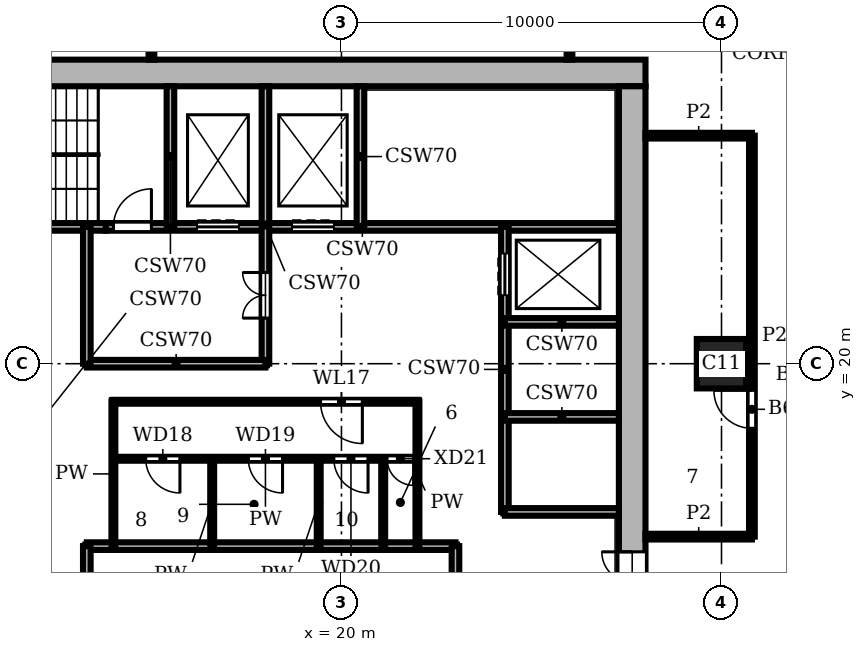
"""IFC4 building model, lengths in metres.
Left out: names, types, materials, properties, quantities, classifications, styles, units other than length and angle.
Written with IfcOpenShell. Run it as: python <this file> out.ifc"""

import sys

from ifc_helpers import new_model, si_unit, direction, frame, frame_2d, origin, origin_2d, place, context, subcontext, project, spatial, rectangle, extrude, element, fill, save


model = new_model("IFC4")
c1 = context("Model", 3, precision=1e-05, world=origin(), true_north=direction((0.0, 1.0)))
c2 = subcontext(c1, "Body", "Model", "MODEL_VIEW")
j1 = project(units=[si_unit("LENGTHUNIT", "METRE"), si_unit("PLANEANGLEUNIT", "RADIAN")], contexts=[c1])
p1 = place(None, origin())
s1 = spatial("IfcSite", under=j1, at=p1, CompositionType="ELEMENT")
p2 = place(p1, origin())
s2 = spatial("IfcBuilding", under=s1, at=p2, CompositionType="ELEMENT")
p3 = place(p2, frame((0.0, 0.0, 190.2)))
s3 = spatial("IfcBuildingStorey", under=s2, at=p3, CompositionType="ELEMENT", Elevation=190.2)
p4 = place(p3, frame((30.0, 20.0, 0.0), z_axis=(0.0, 0.0, 1.0), x_axis=(1.0, 0.0, 0.0)))
e1 = element("IfcColumn", 1, at=p4, inside=s3, PredefinedType="COLUMN", context=c2, shape_type="SweptSolid", body=[
    extrude(rectangle(XDim=1.3, YDim=1.3, at=origin_2d()), origin(), (0.0, 0.0, 1.0), 3.9),
])
p5 = place(p3, frame((27.65, 8.7, 0.0), z_axis=(0.0, 0.0, 1.0), x_axis=(0.0, 1.0, 0.0)))
e2 = element("IfcWall", 2, at=p5, inside=s3, PredefinedType="SHEAR", context=c2, shape_type="SweptSolid", body=[
    extrude(rectangle(XDim=18.6, YDim=0.7, at=frame_2d((9.3, 0.0))), origin(), (0.0, 0.0, 1.0), 3.9),
])
p6 = place(p5, frame((4.75, 0.0, 0.0)))
e3 = element("IfcOpeningElement", 3, at=p6, cuts=e2, PredefinedType="OPENING", context=c2, shape_type="SweptSolid", body=[
    extrude(rectangle(XDim=1.6, YDim=2.1, at=frame_2d((0.8, 1.05))), frame((0.0, 0.36, 0.0), z_axis=(0.0, -1.0, 0.0), x_axis=(1.0, 0.0, 0.0)), (0.0, 0.0, 1.0), 0.72),
])
p7 = place(p3, frame((28.0, 27.65, 0.0), z_axis=(0.0, 0.0, 1.0), x_axis=(-1.0, 0.0, 0.0)))
e4 = element("IfcWall", 4, at=p7, inside=s3, PredefinedType="SHEAR", context=c2, shape_type="SweptSolid", body=[
    extrude(rectangle(XDim=20.0, YDim=0.7, at=frame_2d((10.0, 0.0))), origin(), (0.0, 0.0, 1.0), 3.9),
])
p8 = place(p3, frame((13.3, 15.2, 0.0), z_axis=(0.0, 0.0, 1.0), x_axis=(1.0, 0.0, 0.0)))
e5 = element("IfcWall", 5, at=p8, inside=s3, PredefinedType="SHEAR", context=c2, shape_type="SweptSolid", body=[
    extrude(rectangle(XDim=9.7, YDim=0.2, at=frame_2d((4.85, 0.0))), origin(), (0.0, 0.0, 1.0), 3.58),
])
p9 = place(p3, frame((24.3, 16.1, 0.0), z_axis=(0.0, 0.0, 1.0), x_axis=(1.0, 0.0, 0.0)))
e6 = element("IfcWall", 6, at=p9, inside=s3, PredefinedType="SHEAR", context=c2, shape_type="SweptSolid", body=[
    extrude(rectangle(XDim=3.0, YDim=0.2, at=frame_2d((1.5, 0.0))), origin(), (0.0, 0.0, 1.0), 3.58),
])
p10 = place(p3, frame((14.0, 17.5, 0.0), z_axis=(0.0, 0.0, 1.0), x_axis=(1.0, 0.0, 0.0)))
e7 = element("IfcWall", 7, at=p10, inside=s3, PredefinedType="PARTITIONING", context=c2, shape_type="SweptSolid", body=[
    extrude(rectangle(XDim=8.0, YDim=0.1, at=frame_2d((4.0, 0.0))), origin(), (0.0, 0.0, 1.0), 3.58),
])
p11 = place(p10, frame((0.85, 0.0, 0.0)))
e8 = element("IfcOpeningElement", 8, at=p11, cuts=e7, PredefinedType="OPENING", context=c2, shape_type="SweptSolid", body=[
    extrude(rectangle(XDim=0.9, YDim=2.1, at=frame_2d((0.45, 1.05))), frame((0.0, 0.06, 0.0), z_axis=(0.0, -1.0, 0.0), x_axis=(1.0, 0.0, 0.0)), (0.0, 0.0, 1.0), 0.12),
])
p12 = place(p10, frame((3.55, 0.0, 0.0)))
e9 = element("IfcOpeningElement", 9, at=p12, cuts=e7, PredefinedType="OPENING", context=c2, shape_type="SweptSolid", body=[
    extrude(rectangle(XDim=0.9, YDim=2.1, at=frame_2d((0.45, 1.05))), frame((0.0, 0.06, 0.0), z_axis=(0.0, -1.0, 0.0), x_axis=(1.0, 0.0, 0.0)), (0.0, 0.0, 1.0), 0.12),
])
p13 = place(p10, frame((5.8, 0.0, 0.0)))
e10 = element("IfcOpeningElement", 10, at=p13, cuts=e7, PredefinedType="OPENING", context=c2, shape_type="SweptSolid", body=[
    extrude(rectangle(XDim=0.9, YDim=2.1, at=frame_2d((0.45, 1.05))), frame((0.0, 0.06, 0.0), z_axis=(0.0, -1.0, 0.0), x_axis=(1.0, 0.0, 0.0)), (0.0, 0.0, 1.0), 0.12),
])
p14 = place(p10, frame((7.2, 0.0, 0.0)))
e11 = element("IfcOpeningElement", 11, at=p14, cuts=e7, PredefinedType="OPENING", context=c2, shape_type="SweptSolid", body=[
    extrude(rectangle(XDim=0.7, YDim=2.1, at=frame_2d((0.35, 1.05))), frame((0.0, 0.06, 0.0), z_axis=(0.0, -1.0, 0.0), x_axis=(1.0, 0.0, 0.0)), (0.0, 0.0, 1.0), 0.12),
])
p15 = place(p3, frame((24.3, 18.6, 0.0), z_axis=(0.0, 0.0, 1.0), x_axis=(1.0, 0.0, 0.0)))
e12 = element("IfcWall", 12, at=p15, inside=s3, PredefinedType="SHEAR", context=c2, shape_type="SweptSolid", body=[
    extrude(rectangle(XDim=3.0, YDim=0.2, at=frame_2d((1.5, 0.0))), origin(), (0.0, 0.0, 1.0), 3.58),
])
p16 = place(p3, frame((14.0, 19.0, 0.0), z_axis=(0.0, 0.0, 1.0), x_axis=(1.0, 0.0, 0.0)))
e13 = element("IfcWall", 13, at=p16, inside=s3, PredefinedType="PARTITIONING", context=c2, shape_type="SweptSolid", body=[
    extrude(rectangle(XDim=8.0, YDim=0.1, at=frame_2d((4.0, 0.0))), origin(), (0.0, 0.0, 1.0), 3.58),
])
p17 = place(p16, frame((5.45, 0.0, 0.0)))
e14 = element("IfcOpeningElement", 14, at=p17, cuts=e13, PredefinedType="OPENING", context=c2, shape_type="SweptSolid", body=[
    extrude(rectangle(XDim=1.1, YDim=2.1, at=frame_2d((0.55, 1.05))), frame((0.0, 0.06, 0.0), z_axis=(0.0, -1.0, 0.0), x_axis=(1.0, 0.0, 0.0)), (0.0, 0.0, 1.0), 0.12),
])
p18 = place(p3, frame((13.3, 20.0, 0.0), z_axis=(0.0, 0.0, 1.0), x_axis=(1.0, 0.0, 0.0)))
e15 = element("IfcWall", 15, at=p18, inside=s3, PredefinedType="SHEAR", context=c2, shape_type="SweptSolid", body=[
    extrude(rectangle(XDim=4.7, YDim=0.2, at=frame_2d((2.35, 0.0))), origin(), (0.0, 0.0, 1.0), 3.58),
])
p19 = place(p3, frame((24.3, 21.1, 0.0), z_axis=(0.0, 0.0, 1.0), x_axis=(1.0, 0.0, 0.0)))
e16 = element("IfcWall", 16, at=p19, inside=s3, PredefinedType="SHEAR", context=c2, shape_type="SweptSolid", body=[
    extrude(rectangle(XDim=3.0, YDim=0.2, at=frame_2d((1.5, 0.0))), origin(), (0.0, 0.0, 1.0), 3.58),
])
p20 = place(p3, frame((8.7, 23.6, 0.0), z_axis=(0.0, 0.0, 1.0), x_axis=(1.0, 0.0, 0.0)))
e17 = element("IfcWall", 17, at=p20, inside=s3, PredefinedType="SHEAR", context=c2, shape_type="SweptSolid", body=[
    extrude(rectangle(XDim=5.1, YDim=0.2, at=frame_2d((2.55, 0.0))), origin(), (0.0, 0.0, 1.0), 3.58),
])
p21 = place(p3, frame((13.8, 23.6, 0.0), z_axis=(0.0, 0.0, 1.0), x_axis=(1.0, 0.0, 0.0)))
e18 = element("IfcWall", 18, at=p21, inside=s3, PredefinedType="SHEAR", context=c2, shape_type="SweptSolid", body=[
    extrude(rectangle(XDim=13.5, YDim=0.2, at=frame_2d((6.75, 0.0))), origin(), (0.0, 0.0, 1.0), 3.58),
])
p22 = place(p21, frame((2.4, 0.0, 0.0)))
e19 = element("IfcOpeningElement", 19, at=p22, cuts=e18, PredefinedType="OPENING", context=c2, shape_type="SweptSolid", body=[
    extrude(rectangle(XDim=1.1, YDim=2.1, at=frame_2d((0.55, 1.05))), frame((0.0, 0.11, 0.0), z_axis=(0.0, -1.0, 0.0), x_axis=(1.0, 0.0, 0.0)), (0.0, 0.0, 1.0), 0.22),
])
p23 = place(p21, frame((4.9, 0.0, 0.0)))
e20 = element("IfcOpeningElement", 20, at=p23, cuts=e18, PredefinedType="OPENING", context=c2, shape_type="SweptSolid", body=[
    extrude(rectangle(XDim=1.1, YDim=2.1, at=frame_2d((0.55, 1.05))), frame((0.0, 0.11, 0.0), z_axis=(0.0, -1.0, 0.0), x_axis=(1.0, 0.0, 0.0)), (0.0, 0.0, 1.0), 0.22),
])
p24 = place(p21, frame((0.2, 0.0, 0.0)))
e21 = element("IfcOpeningElement", 21, at=p24, cuts=e18, PredefinedType="OPENING", context=c2, shape_type="SweptSolid", body=[
    extrude(rectangle(XDim=1.0, YDim=2.1, at=frame_2d((0.5, 1.05))), frame((0.0, 0.11, 0.0), z_axis=(0.0, -1.0, 0.0), x_axis=(1.0, 0.0, 0.0)), (0.0, 0.0, 1.0), 0.22),
])
p25 = place(p3, frame((13.3, 12.4, 0.0), z_axis=(0.0, 0.0, 1.0), x_axis=(0.0, 1.0, 0.0)))
e22 = element("IfcWall", 22, at=p25, inside=s3, PredefinedType="SHEAR", context=c2, shape_type="SweptSolid", body=[
    extrude(rectangle(XDim=2.8, YDim=0.2, at=frame_2d((1.4, 0.0))), origin(), (0.0, 0.0, 1.0), 3.58),
])
p26 = place(p3, frame((13.3, 20.0, 0.0), z_axis=(0.0, 0.0, 1.0), x_axis=(0.0, 1.0, 0.0)))
e23 = element("IfcWall", 23, at=p26, inside=s3, PredefinedType="SHEAR", context=c2, shape_type="SweptSolid", body=[
    extrude(rectangle(XDim=3.6, YDim=0.2, at=frame_2d((1.8, 0.0))), origin(), (0.0, 0.0, 1.0), 3.58),
])
p27 = place(p3, frame((14.0, 15.2, 0.0), z_axis=(0.0, 0.0, 1.0), x_axis=(0.0, 1.0, 0.0)))
e24 = element("IfcWall", 24, at=p27, inside=s3, PredefinedType="PARTITIONING", context=c2, shape_type="SweptSolid", body=[
    extrude(rectangle(XDim=3.8, YDim=0.1, at=frame_2d((1.9, 0.0))), origin(), (0.0, 0.0, 1.0), 3.58),
])
p28 = place(p3, frame((15.5, 23.6, 0.0), z_axis=(0.0, 0.0, 1.0), x_axis=(0.0, 1.0, 0.0)))
e25 = element("IfcWall", 25, at=p28, inside=s3, PredefinedType="SHEAR", context=c2, shape_type="SweptSolid", body=[
    extrude(rectangle(XDim=3.7, YDim=0.2, at=frame_2d((1.85, 0.0))), origin(), (0.0, 0.0, 1.0), 3.58),
])
p29 = place(p3, frame((16.6, 15.2, 0.0), z_axis=(0.0, 0.0, 1.0), x_axis=(0.0, 1.0, 0.0)))
e26 = element("IfcWall", 26, at=p29, inside=s3, PredefinedType="PARTITIONING", context=c2, shape_type="SweptSolid", body=[
    extrude(rectangle(XDim=2.3, YDim=0.1, at=frame_2d((1.15, 0.0))), origin(), (0.0, 0.0, 1.0), 3.58),
])
p30 = place(p3, frame((18.0, 20.0, 0.0), z_axis=(0.0, 0.0, 1.0), x_axis=(0.0, 1.0, 0.0)))
e27 = element("IfcWall", 27, at=p30, inside=s3, PredefinedType="SHEAR", context=c2, shape_type="SweptSolid", body=[
    extrude(rectangle(XDim=7.3, YDim=0.2, at=frame_2d((3.65, 0.0))), origin(), (0.0, 0.0, 1.0), 3.58),
])
p31 = place(p30, frame((1.2, 0.0, 0.0)))
e28 = element("IfcOpeningElement", 28, at=p31, cuts=e27, PredefinedType="OPENING", context=c2, shape_type="SweptSolid", body=[
    extrude(rectangle(XDim=1.2, YDim=2.1, at=frame_2d((0.6, 1.05))), frame((0.0, 0.11, 0.0), z_axis=(0.0, -1.0, 0.0), x_axis=(1.0, 0.0, 0.0)), (0.0, 0.0, 1.0), 0.22),
])
p32 = place(p3, frame((19.4, 15.2, 0.0), z_axis=(0.0, 0.0, 1.0), x_axis=(0.0, 1.0, 0.0)))
e29 = element("IfcWall", 29, at=p32, inside=s3, PredefinedType="PARTITIONING", context=c2, shape_type="SweptSolid", body=[
    extrude(rectangle(XDim=2.3, YDim=0.1, at=frame_2d((1.15, 0.0))), origin(), (0.0, 0.0, 1.0), 3.58),
])
p33 = place(p3, frame((20.5, 23.6, 0.0), z_axis=(0.0, 0.0, 1.0), x_axis=(0.0, 1.0, 0.0)))
e30 = element("IfcWall", 30, at=p33, inside=s3, PredefinedType="SHEAR", context=c2, shape_type="SweptSolid", body=[
    extrude(rectangle(XDim=3.7, YDim=0.2, at=frame_2d((1.85, 0.0))), origin(), (0.0, 0.0, 1.0), 3.58),
])
p34 = place(p3, frame((21.1, 15.2, 0.0), z_axis=(0.0, 0.0, 1.0), x_axis=(0.0, 1.0, 0.0)))
e31 = element("IfcWall", 31, at=p34, inside=s3, PredefinedType="PARTITIONING", context=c2, shape_type="SweptSolid", body=[
    extrude(rectangle(XDim=2.3, YDim=0.1, at=frame_2d((1.15, 0.0))), origin(), (0.0, 0.0, 1.0), 3.58),
])
p35 = place(p3, frame((22.0, 15.2, 0.0), z_axis=(0.0, 0.0, 1.0), x_axis=(0.0, 1.0, 0.0)))
e32 = element("IfcWall", 32, at=p35, inside=s3, PredefinedType="PARTITIONING", context=c2, shape_type="SweptSolid", body=[
    extrude(rectangle(XDim=3.8, YDim=0.1, at=frame_2d((1.9, 0.0))), origin(), (0.0, 0.0, 1.0), 3.58),
])
p36 = place(p3, frame((23.0, 12.4, 0.0), z_axis=(0.0, 0.0, 1.0), x_axis=(0.0, 1.0, 0.0)))
e33 = element("IfcWall", 33, at=p36, inside=s3, PredefinedType="SHEAR", context=c2, shape_type="SweptSolid", body=[
    extrude(rectangle(XDim=2.8, YDim=0.2, at=frame_2d((1.4, 0.0))), origin(), (0.0, 0.0, 1.0), 3.58),
])
p37 = place(p36, frame((0.8, 0.0, 0.0)))
e34 = element("IfcOpeningElement", 34, at=p37, cuts=e33, PredefinedType="OPENING", context=c2, shape_type="SweptSolid", body=[
    extrude(rectangle(XDim=1.2, YDim=2.1, at=frame_2d((0.6, 1.05))), frame((0.0, 0.11, 0.0), z_axis=(0.0, -1.0, 0.0), x_axis=(1.0, 0.0, 0.0)), (0.0, 0.0, 1.0), 0.22),
])
p38 = place(p3, frame((24.3, 16.1, 0.0), z_axis=(0.0, 0.0, 1.0), x_axis=(0.0, 1.0, 0.0)))
e35 = element("IfcWall", 35, at=p38, inside=s3, PredefinedType="SHEAR", context=c2, shape_type="SweptSolid", body=[
    extrude(rectangle(XDim=7.5, YDim=0.2, at=frame_2d((3.75, 0.0))), origin(), (0.0, 0.0, 1.0), 3.58),
])
p39 = place(p38, frame((5.7, 0.0, 0.0)))
e36 = element("IfcOpeningElement", 36, at=p39, cuts=e35, PredefinedType="OPENING", context=c2, shape_type="SweptSolid", body=[
    extrude(rectangle(XDim=1.1, YDim=2.1, at=frame_2d((0.55, 1.05))), frame((0.0, 0.11, 0.0), z_axis=(0.0, -1.0, 0.0), x_axis=(1.0, 0.0, 0.0)), (0.0, 0.0, 1.0), 0.22),
])
p40 = place(p3, frame((15.0, 28.0, 0.0), z_axis=(0.0, 0.0, 1.0), x_axis=(0.0, 1.0, 0.0)))
e37 = element("IfcWall", 37, at=p40, inside=s3, PredefinedType="PARTITIONING", context=c2, shape_type="SweptSolid", body=[
    extrude(rectangle(XDim=9.5, YDim=0.15, at=frame_2d((4.75, 0.0))), origin(), (0.0, 0.0, 1.0), 3.58),
])
p41 = place(p3, frame((26.0, 28.0, 0.0), z_axis=(0.0, 0.0, 1.0), x_axis=(0.0, 1.0, 0.0)))
e38 = element("IfcWall", 38, at=p41, inside=s3, PredefinedType="PARTITIONING", context=c2, shape_type="SweptSolid", body=[
    extrude(rectangle(XDim=29.6, YDim=0.15, at=frame_2d((14.8, 0.0))), origin(), (0.0, 0.0, 1.0), 3.58),
])
p42 = place(p41, frame((2.85, 0.0, 0.0)))
e39 = element("IfcOpeningElement", 39, at=p42, cuts=e38, PredefinedType="OPENING", context=c2, shape_type="SweptSolid", body=[
    extrude(rectangle(XDim=1.8, YDim=2.1, at=frame_2d((0.9, 1.05))), frame((0.0, 0.085, 0.0), z_axis=(0.0, -1.0, 0.0), x_axis=(1.0, 0.0, 0.0)), (0.0, 0.0, 1.0), 0.17),
])
p43 = place(p41, frame((12.6, 0.0, 0.0)))
e40 = element("IfcOpeningElement", 40, at=p43, cuts=e38, PredefinedType="OPENING", context=c2, shape_type="SweptSolid", body=[
    extrude(rectangle(XDim=1.8, YDim=2.1, at=frame_2d((0.9, 1.05))), frame((0.0, 0.085, 0.0), z_axis=(0.0, -1.0, 0.0), x_axis=(1.0, 0.0, 0.0)), (0.0, 0.0, 1.0), 0.17),
])
p44 = place(p41, frame((21.6, 0.0, 0.0)))
e41 = element("IfcOpeningElement", 41, at=p44, cuts=e38, PredefinedType="OPENING", context=c2, shape_type="SweptSolid", body=[
    extrude(rectangle(XDim=1.0, YDim=2.1, at=frame_2d((0.5, 1.05))), frame((0.0, 0.085, 0.0), z_axis=(0.0, -1.0, 0.0), x_axis=(1.0, 0.0, 0.0)), (0.0, 0.0, 1.0), 0.17),
])
p45 = place(p3, frame((30.8, 15.45, 0.0), z_axis=(0.0, 0.0, 1.0), x_axis=(0.0, 1.0, 0.0)))
e42 = element("IfcWall", 42, at=p45, inside=s3, PredefinedType="PARTITIONING", context=c2, shape_type="SweptSolid", body=[
    extrude(rectangle(XDim=10.55, YDim=0.15, at=frame_2d((5.275, 0.0))), origin(), (0.0, 0.0, 1.0), 3.58),
])
p46 = place(p45, frame((2.85, 0.0, 0.0)))
e43 = element("IfcOpeningElement", 43, at=p46, cuts=e42, PredefinedType="OPENING", context=c2, shape_type="SweptSolid", body=[
    extrude(rectangle(XDim=1.0, YDim=2.1, at=frame_2d((0.5, 1.05))), frame((0.0, 0.085, 0.0), z_axis=(0.0, -1.0, 0.0), x_axis=(1.0, 0.0, 0.0)), (0.0, 0.0, 1.0), 0.17),
])
for number, where, z_axis, x_axis in (
    (44, (28.0, 15.45, 0.0), (0.0, 0.0, 1.0), (1.0, 0.0, 0.0)),
    (45, (28.0, 26.0, 0.0), (0.0, 0.0, 1.0), (1.0, 0.0, 0.0)),
):
    element("IfcWall", number, at=place(p3, frame(where, z_axis=z_axis, x_axis=x_axis)), inside=s3, PredefinedType="PARTITIONING", context=c2, shape_type="SweptSolid", body=[
        extrude(rectangle(XDim=2.8, YDim=0.15, at=frame_2d((1.4, 0.0))), origin(), (0.0, 0.0, 1.0), 3.58),
    ])
p47 = place(p39, origin())
e46 = element("IfcDoor", 46, at=p47, inside=s3, OperationType="DOUBLE_DOOR_SLIDING", PredefinedType="DOOR", context=c2, shape_type="SweptSolid", body=[
    extrude(rectangle(XDim=1.1, YDim=2.1, at=frame_2d((0.55, 1.05))), frame((0.0, 0.025, 0.0), z_axis=(0.0, -1.0, 0.0), x_axis=(1.0, 0.0, 0.0)), (0.0, 0.0, 1.0), 0.05),
])
fill(e36, e46)
p48 = place(p22, origin())
e47 = element("IfcDoor", 47, at=p48, inside=s3, OperationType="DOUBLE_DOOR_SLIDING", PredefinedType="DOOR", context=c2, shape_type="SweptSolid", body=[
    extrude(rectangle(XDim=1.1, YDim=2.1, at=frame_2d((0.55, 1.05))), frame((0.0, 0.025, 0.0), z_axis=(0.0, -1.0, 0.0), x_axis=(1.0, 0.0, 0.0)), (0.0, 0.0, 1.0), 0.05),
])
fill(e19, e47)
p49 = place(p23, origin())
e48 = element("IfcDoor", 48, at=p49, inside=s3, OperationType="DOUBLE_DOOR_SLIDING", PredefinedType="DOOR", context=c2, shape_type="SweptSolid", body=[
    extrude(rectangle(XDim=1.1, YDim=2.1, at=frame_2d((0.55, 1.05))), frame((0.0, 0.025, 0.0), z_axis=(0.0, -1.0, 0.0), x_axis=(1.0, 0.0, 0.0)), (0.0, 0.0, 1.0), 0.05),
])
fill(e20, e48)
p50 = place(p24, origin())
e49 = element("IfcDoor", 49, at=p50, inside=s3, OperationType="SINGLE_SWING_RIGHT", PredefinedType="DOOR", context=c2, shape_type="SweptSolid", body=[
    extrude(rectangle(XDim=1.0, YDim=2.1, at=frame_2d((0.5, 1.05))), frame((0.0, 0.025, 0.0), z_axis=(0.0, -1.0, 0.0), x_axis=(1.0, 0.0, 0.0)), (0.0, 0.0, 1.0), 0.05),
])
fill(e21, e49)
p51 = place(p31, origin())
e50 = element("IfcDoor", 50, at=p51, inside=s3, OperationType="DOUBLE_DOOR_SINGLE_SWING", PredefinedType="DOOR", context=c2, shape_type="SweptSolid", body=[
    extrude(rectangle(XDim=1.2, YDim=2.1, at=frame_2d((0.6, 1.05))), frame((0.0, 0.025, 0.0), z_axis=(0.0, -1.0, 0.0), x_axis=(1.0, 0.0, 0.0)), (0.0, 0.0, 1.0), 0.05),
])
fill(e28, e50)
p52 = place(p17, frame((1.1, 0.0, 0.0), z_axis=(0.0, 0.0, 1.0), x_axis=(-1.0, 0.0, 0.0)))
e51 = element("IfcDoor", 51, at=p52, inside=s3, OperationType="SINGLE_SWING_LEFT", PredefinedType="DOOR", context=c2, shape_type="SweptSolid", body=[
    extrude(rectangle(XDim=1.1, YDim=2.1, at=frame_2d((0.55, 1.05))), frame((0.0, 0.025, 0.0), z_axis=(0.0, -1.0, 0.0), x_axis=(1.0, 0.0, 0.0)), (0.0, 0.0, 1.0), 0.05),
])
fill(e14, e51)
p53 = place(p11, frame((0.9, 0.0, 0.0), z_axis=(0.0, 0.0, 1.0), x_axis=(-1.0, 0.0, 0.0)))
e52 = element("IfcDoor", 52, at=p53, inside=s3, OperationType="SINGLE_SWING_LEFT", PredefinedType="DOOR", context=c2, shape_type="SweptSolid", body=[
    extrude(rectangle(XDim=0.9, YDim=2.1, at=frame_2d((0.45, 1.05))), frame((0.0, 0.025, 0.0), z_axis=(0.0, -1.0, 0.0), x_axis=(1.0, 0.0, 0.0)), (0.0, 0.0, 1.0), 0.05),
])
fill(e8, e52)
p54 = place(p12, frame((0.9, 0.0, 0.0), z_axis=(0.0, 0.0, 1.0), x_axis=(-1.0, 0.0, 0.0)))
e53 = element("IfcDoor", 53, at=p54, inside=s3, OperationType="SINGLE_SWING_LEFT", PredefinedType="DOOR", context=c2, shape_type="SweptSolid", body=[
    extrude(rectangle(XDim=0.9, YDim=2.1, at=frame_2d((0.45, 1.05))), frame((0.0, 0.025, 0.0), z_axis=(0.0, -1.0, 0.0), x_axis=(1.0, 0.0, 0.0)), (0.0, 0.0, 1.0), 0.05),
])
fill(e9, e53)
p55 = place(p13, frame((0.9, 0.0, 0.0), z_axis=(0.0, 0.0, 1.0), x_axis=(-1.0, 0.0, 0.0)))
e54 = element("IfcDoor", 54, at=p55, inside=s3, OperationType="SINGLE_SWING_LEFT", PredefinedType="DOOR", context=c2, shape_type="SweptSolid", body=[
    extrude(rectangle(XDim=0.9, YDim=2.1, at=frame_2d((0.45, 1.05))), frame((0.0, 0.025, 0.0), z_axis=(0.0, -1.0, 0.0), x_axis=(1.0, 0.0, 0.0)), (0.0, 0.0, 1.0), 0.05),
])
fill(e10, e54)
p56 = place(p14, frame((0.7, 0.0, 0.0), z_axis=(0.0, 0.0, 1.0), x_axis=(-1.0, 0.0, 0.0)))
e55 = element("IfcDoor", 55, at=p56, inside=s3, OperationType="SINGLE_SWING_LEFT", PredefinedType="DOOR", context=c2, shape_type="SweptSolid", body=[
    extrude(rectangle(XDim=0.7, YDim=2.1, at=frame_2d((0.35, 1.05))), frame((0.0, 0.025, 0.0), z_axis=(0.0, -1.0, 0.0), x_axis=(1.0, 0.0, 0.0)), (0.0, 0.0, 1.0), 0.05),
])
fill(e11, e55)
p57 = place(p6, origin())
e56 = element("IfcDoor", 56, at=p57, inside=s3, OperationType="DOUBLE_DOOR_SINGLE_SWING", PredefinedType="DOOR", context=c2, shape_type="SweptSolid", body=[
    extrude(rectangle(XDim=1.6, YDim=2.1, at=frame_2d((0.8, 1.05))), frame((0.0, 0.025, 0.0), z_axis=(0.0, -1.0, 0.0), x_axis=(1.0, 0.0, 0.0)), (0.0, 0.0, 1.0), 0.05),
])
fill(e3, e56)
p58 = place(p46, origin())
e57 = element("IfcDoor", 57, at=p58, inside=s3, OperationType="SINGLE_SWING_RIGHT", PredefinedType="DOOR", context=c2, shape_type="SweptSolid", body=[
    extrude(rectangle(XDim=1.0, YDim=2.1, at=frame_2d((0.5, 1.05))), frame((0.0, 0.025, 0.0), z_axis=(0.0, -1.0, 0.0), x_axis=(1.0, 0.0, 0.0)), (0.0, 0.0, 1.0), 0.05),
])
fill(e43, e57)
save(model, sys.argv[1])
